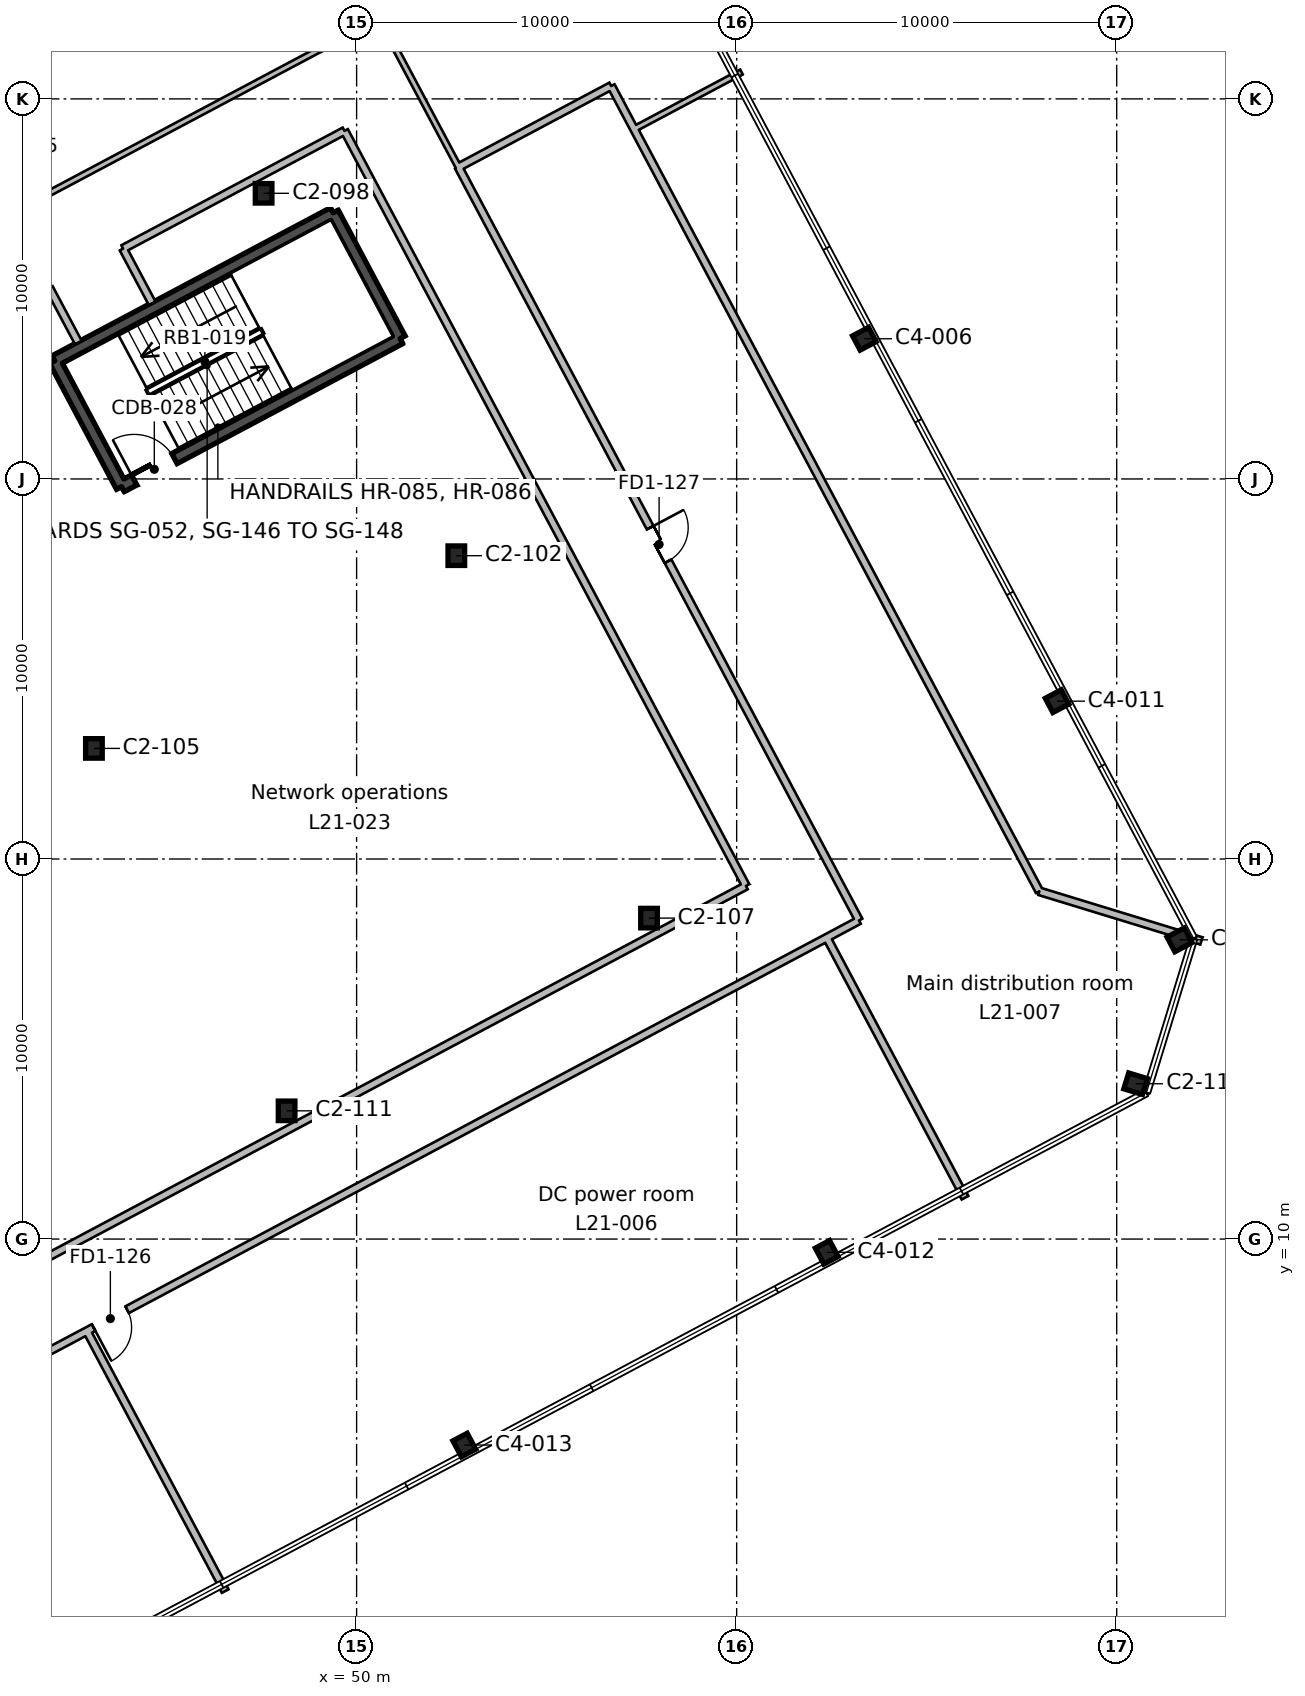
"""IFC4 building model, lengths in metres.
Left out: names, types, materials, properties, quantities, classifications, styles, units other than length and angle.
Written with IfcOpenShell. Run it as: python <this file> out.ifc"""

import sys

from ifc_helpers import new_model, si_unit, direction, frame, frame_2d, origin, origin_2d, place, context, subcontext, project, spatial, rectangle, i_section, extrude, element, fill, save


model = new_model("IFC4")
c1 = context("Model", 3, precision=1e-05, world=origin(), true_north=direction((0.0, 1.0)))
c2 = subcontext(c1, "Body", "Model", "MODEL_VIEW")
j1 = project(units=[si_unit("LENGTHUNIT", "METRE"), si_unit("PLANEANGLEUNIT", "RADIAN")], contexts=[c1])
p1 = place(None, origin())
s1 = spatial("IfcSite", under=j1, at=p1, CompositionType="ELEMENT")
p2 = place(p1, origin())
s2 = spatial("IfcBuilding", under=s1, at=p2, CompositionType="ELEMENT")
p3 = place(p2, frame((0.0, 0.0, 107.6)))
s3 = spatial("IfcBuildingStorey", under=s2, at=p3, CompositionType="ELEMENT", Elevation=107.6)
for number, where, z_axis, x_axis in (
    (1, (52.834, 4.58, 0.0), (0.0, 0.0, 1.0), (0.883, 0.469, 0.0)),
    (2, (62.37, 9.651, 0.0), (0.0, 0.0, 1.0), (0.883, 0.469, 0.0)),
):
    element("IfcColumn", number, at=place(p3, frame(where, z_axis=z_axis, x_axis=x_axis)), inside=s3, PredefinedType="COLUMN", context=c2, shape_type="SweptSolid", body=[
        extrude(i_section(OverallWidth=0.424, OverallDepth=0.475, WebThickness=0.048, FlangeThickness=0.077, FilletRadius=0.015, at=origin_2d()), origin(), (0.0, 0.0, 1.0), 4.6),
    ])
for number, where, z_axis, x_axis in (
    (3, (48.158, 13.374, 0.0), (0.0, 0.0, 1.0), (1.0, 0.0, 0.0)),
    (4, (70.497, 14.087, 0.0), (0.0, 0.0, 1.0), (0.292, 0.956, 0.0)),
    (5, (71.654, 17.873, 0.0), (0.0, 0.0, 1.0), (-0.469, 0.883, 0.0)),
    (6, (57.694, 18.445, 0.0), (0.0, 0.0, 1.0), (1.0, 0.0, 0.0)),
    (7, (43.088, 22.91, 0.0), (0.0, 0.0, 1.0), (1.0, 0.0, 0.0)),
):
    element("IfcColumn", number, at=place(p3, frame(where, z_axis=z_axis, x_axis=x_axis)), inside=s3, PredefinedType="COLUMN", context=c2, shape_type="SweptSolid", body=[
        extrude(i_section(OverallWidth=0.437, OverallDepth=0.513, WebThickness=0.061, FlangeThickness=0.097, FilletRadius=0.015, at=origin_2d()), origin(), (0.0, 0.0, 1.0), 4.6),
    ])
p4 = place(p3, frame((68.431, 24.153, 0.0), z_axis=(0.0, 0.0, 1.0), x_axis=(-0.469471562786, 0.882947592859, 0.0)))
e8 = element("IfcColumn", 8, at=p4, inside=s3, PredefinedType="COLUMN", context=c2, shape_type="SweptSolid", body=[
    extrude(i_section(OverallWidth=0.424, OverallDepth=0.475, WebThickness=0.048, FlangeThickness=0.077, FilletRadius=0.015, at=origin_2d()), origin(), (0.0, 0.0, 1.0), 4.6),
])
p5 = place(p3, frame((52.624, 27.981, 0.0), z_axis=(0.0, 0.0, 1.0), x_axis=(1.0, 0.0, 0.0)))
e9 = element("IfcColumn", 9, at=p5, inside=s3, PredefinedType="COLUMN", context=c2, shape_type="SweptSolid", body=[
    extrude(i_section(OverallWidth=0.437, OverallDepth=0.513, WebThickness=0.061, FlangeThickness=0.097, FilletRadius=0.015, at=origin_2d()), origin(), (0.0, 0.0, 1.0), 4.6),
])
p6 = place(p3, frame((63.36, 33.689, 0.0), z_axis=(0.0, 0.0, 1.0), x_axis=(-0.469471562786, 0.882947592859, 0.0)))
e10 = element("IfcColumn", 10, at=p6, inside=s3, PredefinedType="COLUMN", context=c2, shape_type="SweptSolid", body=[
    extrude(i_section(OverallWidth=0.424, OverallDepth=0.475, WebThickness=0.048, FlangeThickness=0.077, FilletRadius=0.015, at=origin_2d()), origin(), (0.0, 0.0, 1.0), 4.6),
])
p7 = place(p3, frame((47.553, 37.516, 0.0), z_axis=(0.0, 0.0, 1.0), x_axis=(1.0, 0.0, 0.0)))
e11 = element("IfcColumn", 11, at=p7, inside=s3, PredefinedType="COLUMN", context=c2, shape_type="SweptSolid", body=[
    extrude(i_section(OverallWidth=0.437, OverallDepth=0.513, WebThickness=0.061, FlangeThickness=0.097, FilletRadius=0.015, at=origin_2d()), origin(), (0.0, 0.0, 1.0), 4.6),
])
p8 = place(p3, frame((49.384, 37.004, 0.0), z_axis=(0.0, 0.0, 1.0), x_axis=(0.46946936446, -0.882948761726, 0.0)))
e12 = element("IfcWall", 12, at=p8, inside=s3, PredefinedType="SHEAR", context=c2, shape_type="SweptSolid", body=[
    extrude(rectangle(XDim=3.75, YDim=0.3, at=frame_2d((1.875, 0.0))), origin(), (0.0, 0.0, 1.0), 4.6),
])
p9 = place(p3, frame((51.145, 33.693, 0.0), z_axis=(0.0, 0.0, 1.0), x_axis=(-0.882945809314, -0.469474917132, 0.0)))
e13 = element("IfcWall", 13, at=p9, inside=s3, PredefinedType="SHEAR", context=c2, shape_type="SweptSolid", body=[
    extrude(rectangle(XDim=8.3, YDim=0.3, at=frame_2d((4.15, 0.0))), origin(), (0.0, 0.0, 1.0), 4.6),
])
p10 = place(p9, frame((6.725, 0.0, 0.0)))
e14 = element("IfcOpeningElement", 14, at=p10, cuts=e13, PredefinedType="OPENING", context=c2, shape_type="SweptSolid", body=[
    extrude(rectangle(XDim=1.2, YDim=2.1, at=frame_2d((0.6, 1.05))), frame((0.0, 0.16, 0.0), z_axis=(0.0, -1.0, 0.0), x_axis=(1.0, 0.0, 0.0)), (0.0, 0.0, 1.0), 0.32),
])
p11 = place(p3, frame((43.816, 29.796, 0.0), z_axis=(0.0, 0.0, 1.0), x_axis=(-0.46946936446, 0.882948761726, 0.0)))
e15 = element("IfcWall", 15, at=p11, inside=s3, PredefinedType="SHEAR", context=c2, shape_type="SweptSolid", body=[
    extrude(rectangle(XDim=3.75, YDim=0.3, at=frame_2d((1.875, 0.0))), origin(), (0.0, 0.0, 1.0), 4.6),
])
p12 = place(p3, frame((42.055, 33.107, 0.0), z_axis=(0.0, 0.0, 1.0), x_axis=(0.882945809314, 0.469474917132, 0.0)))
e16 = element("IfcWall", 16, at=p12, inside=s3, PredefinedType="SHEAR", context=c2, shape_type="SweptSolid", body=[
    extrude(rectangle(XDim=8.3, YDim=0.3, at=frame_2d((4.15, 0.0))), origin(), (0.0, 0.0, 1.0), 4.6),
])
p13 = place(p3, frame((62.372, 17.93, 0.0), z_axis=(0.0, 0.0, 1.0), x_axis=(-0.88295234377, -0.469462627513, 0.0)))
e17 = element("IfcWall", 17, at=p13, inside=s3, PredefinedType="PARTITIONING", context=c2, shape_type="SweptSolid", body=[
    extrude(rectangle(XDim=55.237, YDim=0.2, at=frame_2d((27.619, 0.0))), origin(), (0.0, 0.0, 1.0), 4.15),
])
p14 = place(p13, frame((38.75, 0.0, 0.0)))
e18 = element("IfcOpeningElement", 18, at=p14, cuts=e17, PredefinedType="OPENING", context=c2, shape_type="SweptSolid", body=[
    extrude(rectangle(XDim=1.0, YDim=2.1, at=frame_2d((0.5, 1.05))), frame((0.0, 0.11, 0.0), z_axis=(0.0, -1.0, 0.0), x_axis=(1.0, 0.0, 0.0)), (0.0, 0.0, 1.0), 0.22),
])
p15 = place(p13, frame((27.15, 0.0, 0.0)))
e19 = element("IfcOpeningElement", 19, at=p15, cuts=e17, PredefinedType="OPENING", context=c2, shape_type="SweptSolid", body=[
    extrude(rectangle(XDim=1.0, YDim=2.1, at=frame_2d((0.5, 1.05))), frame((0.0, 0.11, 0.0), z_axis=(0.0, -1.0, 0.0), x_axis=(1.0, 0.0, 0.0)), (0.0, 0.0, 1.0), 0.22),
])
p16 = place(p13, frame((20.85, 0.0, 0.0)))
e20 = element("IfcOpeningElement", 20, at=p16, cuts=e17, PredefinedType="OPENING", context=c2, shape_type="SweptSolid", body=[
    extrude(rectangle(XDim=1.0, YDim=2.1, at=frame_2d((0.5, 1.05))), frame((0.0, 0.11, 0.0), z_axis=(0.0, -1.0, 0.0), x_axis=(1.0, 0.0, 0.0)), (0.0, 0.0, 1.0), 0.22),
])
p17 = place(p3, frame((42.904, 7.579, 0.0), z_axis=(0.0, 0.0, 1.0), x_axis=(0.469565949875, -0.882897399882, 0.0)))
e21 = element("IfcWall", 21, at=p17, inside=s3, PredefinedType="PARTITIONING", context=c2, shape_type="SweptSolid", body=[
    extrude(rectangle(XDim=7.75, YDim=0.2, at=frame_2d((3.875, 0.0))), origin(), (0.0, 0.0, 1.0), 4.15),
])
p18 = place(p3, frame((52.678, 38.21, 0.0), z_axis=(0.0, 0.0, 1.0), x_axis=(-0.469641219027, 0.882857364126, 0.0)))
e22 = element("IfcWall", 22, at=p18, inside=s3, PredefinedType="PARTITIONING", context=c2, shape_type="SweptSolid", body=[
    extrude(rectangle(XDim=4.444, YDim=0.15, at=frame_2d((2.222, 0.0))), origin(), (0.0, 0.0, 1.0), 4.15),
])
p19 = place(p3, frame((31.888, 32.188, 0.0), z_axis=(0.0, 0.0, 1.0), x_axis=(0.882949135821, 0.469468660884, 0.0)))
e23 = element("IfcWall", 23, at=p19, inside=s3, PredefinedType="PARTITIONING", context=c2, shape_type="SweptSolid", body=[
    extrude(rectangle(XDim=21.184, YDim=0.15, at=frame_2d((10.592, 0.0))), origin(), (0.0, 0.0, 1.0), 4.15),
])
p20 = place(p19, frame((10.05, 0.0, 0.0)))
e24 = element("IfcOpeningElement", 24, at=p20, cuts=e23, PredefinedType="OPENING", context=c2, shape_type="SweptSolid", body=[
    extrude(rectangle(XDim=1.0, YDim=2.1, at=frame_2d((0.5, 1.05))), frame((0.0, 0.085, 0.0), z_axis=(0.0, -1.0, 0.0), x_axis=(1.0, 0.0, 0.0)), (0.0, 0.0, 1.0), 0.17),
])
p21 = place(p3, frame((33.847, 38.384, 0.0), z_axis=(0.0, 0.0, 1.0), x_axis=(0.882976275084, 0.469417615391, 0.0)))
e25 = element("IfcWall", 25, at=p21, inside=s3, PredefinedType="PARTITIONING", context=c2, shape_type="SweptSolid", body=[
    extrude(rectangle(XDim=18.094, YDim=0.15, at=frame_2d((9.047, 0.0))), origin(), (0.0, 0.0, 1.0), 4.15),
])
p22 = place(p3, frame((44.62, 34.623, 0.0), z_axis=(0.0, 0.0, 1.0), x_axis=(-0.46980196406, 0.882771836074, 0.0)))
e26 = element("IfcWall", 26, at=p22, inside=s3, PredefinedType="PARTITIONING", context=c2, shape_type="SweptSolid", body=[
    extrude(rectangle(XDim=1.628, YDim=0.2, at=frame_2d((0.814, 0.0))), origin(), (0.0, 0.0, 1.0), 4.15),
])
p23 = place(p3, frame((43.855, 36.06, 0.0), z_axis=(0.0, 0.0, 1.0), x_axis=(0.882967665993, 0.469433808765, 0.0)))
e27 = element("IfcWall", 27, at=p23, inside=s3, PredefinedType="PARTITIONING", context=c2, shape_type="SweptSolid", body=[
    extrude(rectangle(XDim=6.599, YDim=0.2, at=frame_2d((3.3, 0.0))), origin(), (0.0, 0.0, 1.0), 4.15),
])
p24 = place(p3, frame((49.682, 39.158, 0.0), z_axis=(0.0, 0.0, 1.0), x_axis=(0.469464330369, -0.882951438365, 0.0)))
e28 = element("IfcWall", 28, at=p24, inside=s3, PredefinedType="PARTITIONING", context=c2, shape_type="SweptSolid", body=[
    extrude(rectangle(XDim=22.5, YDim=0.2, at=frame_2d((11.25, 0.0))), origin(), (0.0, 0.0, 1.0), 4.15),
])
p25 = place(p3, frame((60.245, 19.291, 0.0), z_axis=(0.0, 0.0, 1.0), x_axis=(-0.882964229992, -0.469440271552, 0.0)))
e29 = element("IfcWall", 29, at=p25, inside=s3, PredefinedType="PARTITIONING", context=c2, shape_type="SweptSolid", body=[
    extrude(rectangle(XDim=22.25, YDim=0.2, at=frame_2d((11.125, 0.0))), origin(), (0.0, 0.0, 1.0), 4.15),
])
p26 = place(p3, frame((41.913, 35.027, 0.0), z_axis=(0.0, 0.0, 1.0), x_axis=(0.469334342094, -0.883020540719, 0.0)))
e30 = element("IfcWall", 30, at=p26, inside=s3, PredefinedType="PARTITIONING", context=c2, shape_type="SweptSolid", body=[
    extrude(rectangle(XDim=1.628, YDim=0.2, at=frame_2d((0.814, 0.0))), origin(), (0.0, 0.0, 1.0), 4.15),
])
p27 = place(p3, frame((62.371, 17.93, 0.0), z_axis=(0.0, 0.0, 1.0), x_axis=(0.469415477281, -0.882977411766, 0.0)))
e31 = element("IfcWall", 31, at=p27, inside=s3, PredefinedType="PARTITIONING", context=c2, shape_type="SweptSolid", body=[
    extrude(rectangle(XDim=7.75, YDim=0.2, at=frame_2d((3.875, 0.0))), origin(), (0.0, 0.0, 1.0), 4.15),
])
p28 = place(p3, frame((52.678, 38.21, 0.0), z_axis=(0.0, 0.0, 1.0), x_axis=(0.469466013918, -0.882950543222, 0.0)))
e32 = element("IfcWall", 32, at=p28, inside=s3, PredefinedType="PARTITIONING", context=c2, shape_type="SweptSolid", body=[
    extrude(rectangle(XDim=22.455, YDim=0.2, at=frame_2d((11.228, 0.0))), origin(), (0.0, 0.0, 1.0), 4.15),
])
p29 = place(p28, frame((10.75, 0.0, 0.0)))
e33 = element("IfcOpeningElement", 33, at=p29, cuts=e32, PredefinedType="OPENING", context=c2, shape_type="SweptSolid", body=[
    extrude(rectangle(XDim=1.0, YDim=2.1, at=frame_2d((0.5, 1.05))), frame((0.0, 0.11, 0.0), z_axis=(0.0, -1.0, 0.0), x_axis=(1.0, 0.0, 0.0)), (0.0, 0.0, 1.0), 0.22),
])
p30 = place(p3, frame((52.681, 38.204, 0.0), z_axis=(0.0, 0.0, 1.0), x_axis=(0.882941964913, 0.46948214726, 0.0)))
e34 = element("IfcWall", 34, at=p30, inside=s3, PredefinedType="PARTITIONING", context=c2, shape_type="SweptSolid", body=[
    extrude(rectangle(XDim=4.55, YDim=0.2, at=frame_2d((2.275, 0.0))), origin(), (0.0, 0.0, 1.0), 4.15),
])
p31 = place(p3, frame((56.698, 40.34, 0.0), z_axis=(0.0, 0.0, 1.0), x_axis=(0.469224785277, -0.883078762559, 0.0)))
e35 = element("IfcWall", 35, at=p31, inside=s3, PredefinedType="PARTITIONING", context=c2, shape_type="SweptSolid", body=[
    extrude(rectangle(XDim=1.283, YDim=0.2, at=frame_2d((0.642, 0.0))), origin(), (0.0, 0.0, 1.0), 4.15),
])
p32 = place(p3, frame((57.3, 39.207, 0.0), z_axis=(0.0, 0.0, 1.0), x_axis=(0.469454330498, -0.882956755213, 0.0)))
e36 = element("IfcWall", 36, at=p32, inside=s3, PredefinedType="PARTITIONING", context=c2, shape_type="SweptSolid", body=[
    extrude(rectangle(XDim=22.716, YDim=0.2, at=frame_2d((11.358, 0.0))), origin(), (0.0, 0.0, 1.0), 4.15),
])
p33 = place(p3, frame((67.964, 19.15, 0.0), z_axis=(0.0, 0.0, 1.0), x_axis=(0.956240594273, -0.292581485854, 0.0)))
e37 = element("IfcWall", 37, at=p33, inside=s3, PredefinedType="PARTITIONING", context=c2, shape_type="SweptSolid", body=[
    extrude(rectangle(XDim=4.46, YDim=0.2, at=frame_2d((2.23, 0.0))), origin(), (0.0, 0.0, 1.0), 4.15),
])
p34 = place(p3, frame((60.127, 40.707, 0.0), z_axis=(0.0, 0.0, 1.0), x_axis=(-0.883027796121, -0.469320691295, 0.0)))
e38 = element("IfcWall", 38, at=p34, inside=s3, PredefinedType="PARTITIONING", context=c2, shape_type="SweptSolid", body=[
    extrude(rectangle(XDim=3.2, YDim=0.15, at=frame_2d((1.6, 0.0))), origin(), (0.0, 0.0, 1.0), 4.15),
])
p35 = place(p3, frame((62.372, 17.93, 0.0), z_axis=(0.0, 0.0, 1.0), x_axis=(0.881958970198, 0.471326187356, 0.0)))
e39 = element("IfcWall", 39, at=p35, inside=s3, PredefinedType="PARTITIONING", context=c2, shape_type="SweptSolid", body=[
    extrude(rectangle(XDim=0.961, YDim=0.2, at=frame_2d((0.481, 0.0))), origin(), (0.0, 0.0, 1.0), 4.15),
])
p36 = place(p10, frame((1.2, 0.0, 0.0), z_axis=(0.0, 0.0, 1.0), x_axis=(-1.0, 0.0, 0.0)))
e40 = element("IfcDoor", 40, at=p36, inside=s3, OperationType="SINGLE_SWING_LEFT", PredefinedType="DOOR", context=c2, shape_type="SweptSolid", body=[
    extrude(rectangle(XDim=1.2, YDim=2.1, at=frame_2d((0.6, 1.05))), frame((0.0, 0.025, 0.0), z_axis=(0.0, -1.0, 0.0), x_axis=(1.0, 0.0, 0.0)), (0.0, 0.0, 1.0), 0.05),
])
fill(e14, e40)
p37 = place(p16, origin())
e41 = element("IfcDoor", 41, at=p37, inside=s3, OperationType="SINGLE_SWING_RIGHT", PredefinedType="DOOR", context=c2, shape_type="SweptSolid", body=[
    extrude(rectangle(XDim=1.0, YDim=2.1, at=frame_2d((0.5, 1.05))), frame((0.0, 0.025, 0.0), z_axis=(0.0, -1.0, 0.0), x_axis=(1.0, 0.0, 0.0)), (0.0, 0.0, 1.0), 0.05),
])
fill(e20, e41)
p38 = place(p29, origin())
e42 = element("IfcDoor", 42, at=p38, inside=s3, OperationType="SINGLE_SWING_LEFT", PredefinedType="DOOR", context=c2, shape_type="SweptSolid", body=[
    extrude(rectangle(XDim=1.0, YDim=2.1, at=frame_2d((0.5, 1.05))), frame((0.0, 0.025, 0.0), z_axis=(0.0, -1.0, 0.0), x_axis=(1.0, 0.0, 0.0)), (0.0, 0.0, 1.0), 0.05),
])
fill(e33, e42)
save(model, sys.argv[1])
